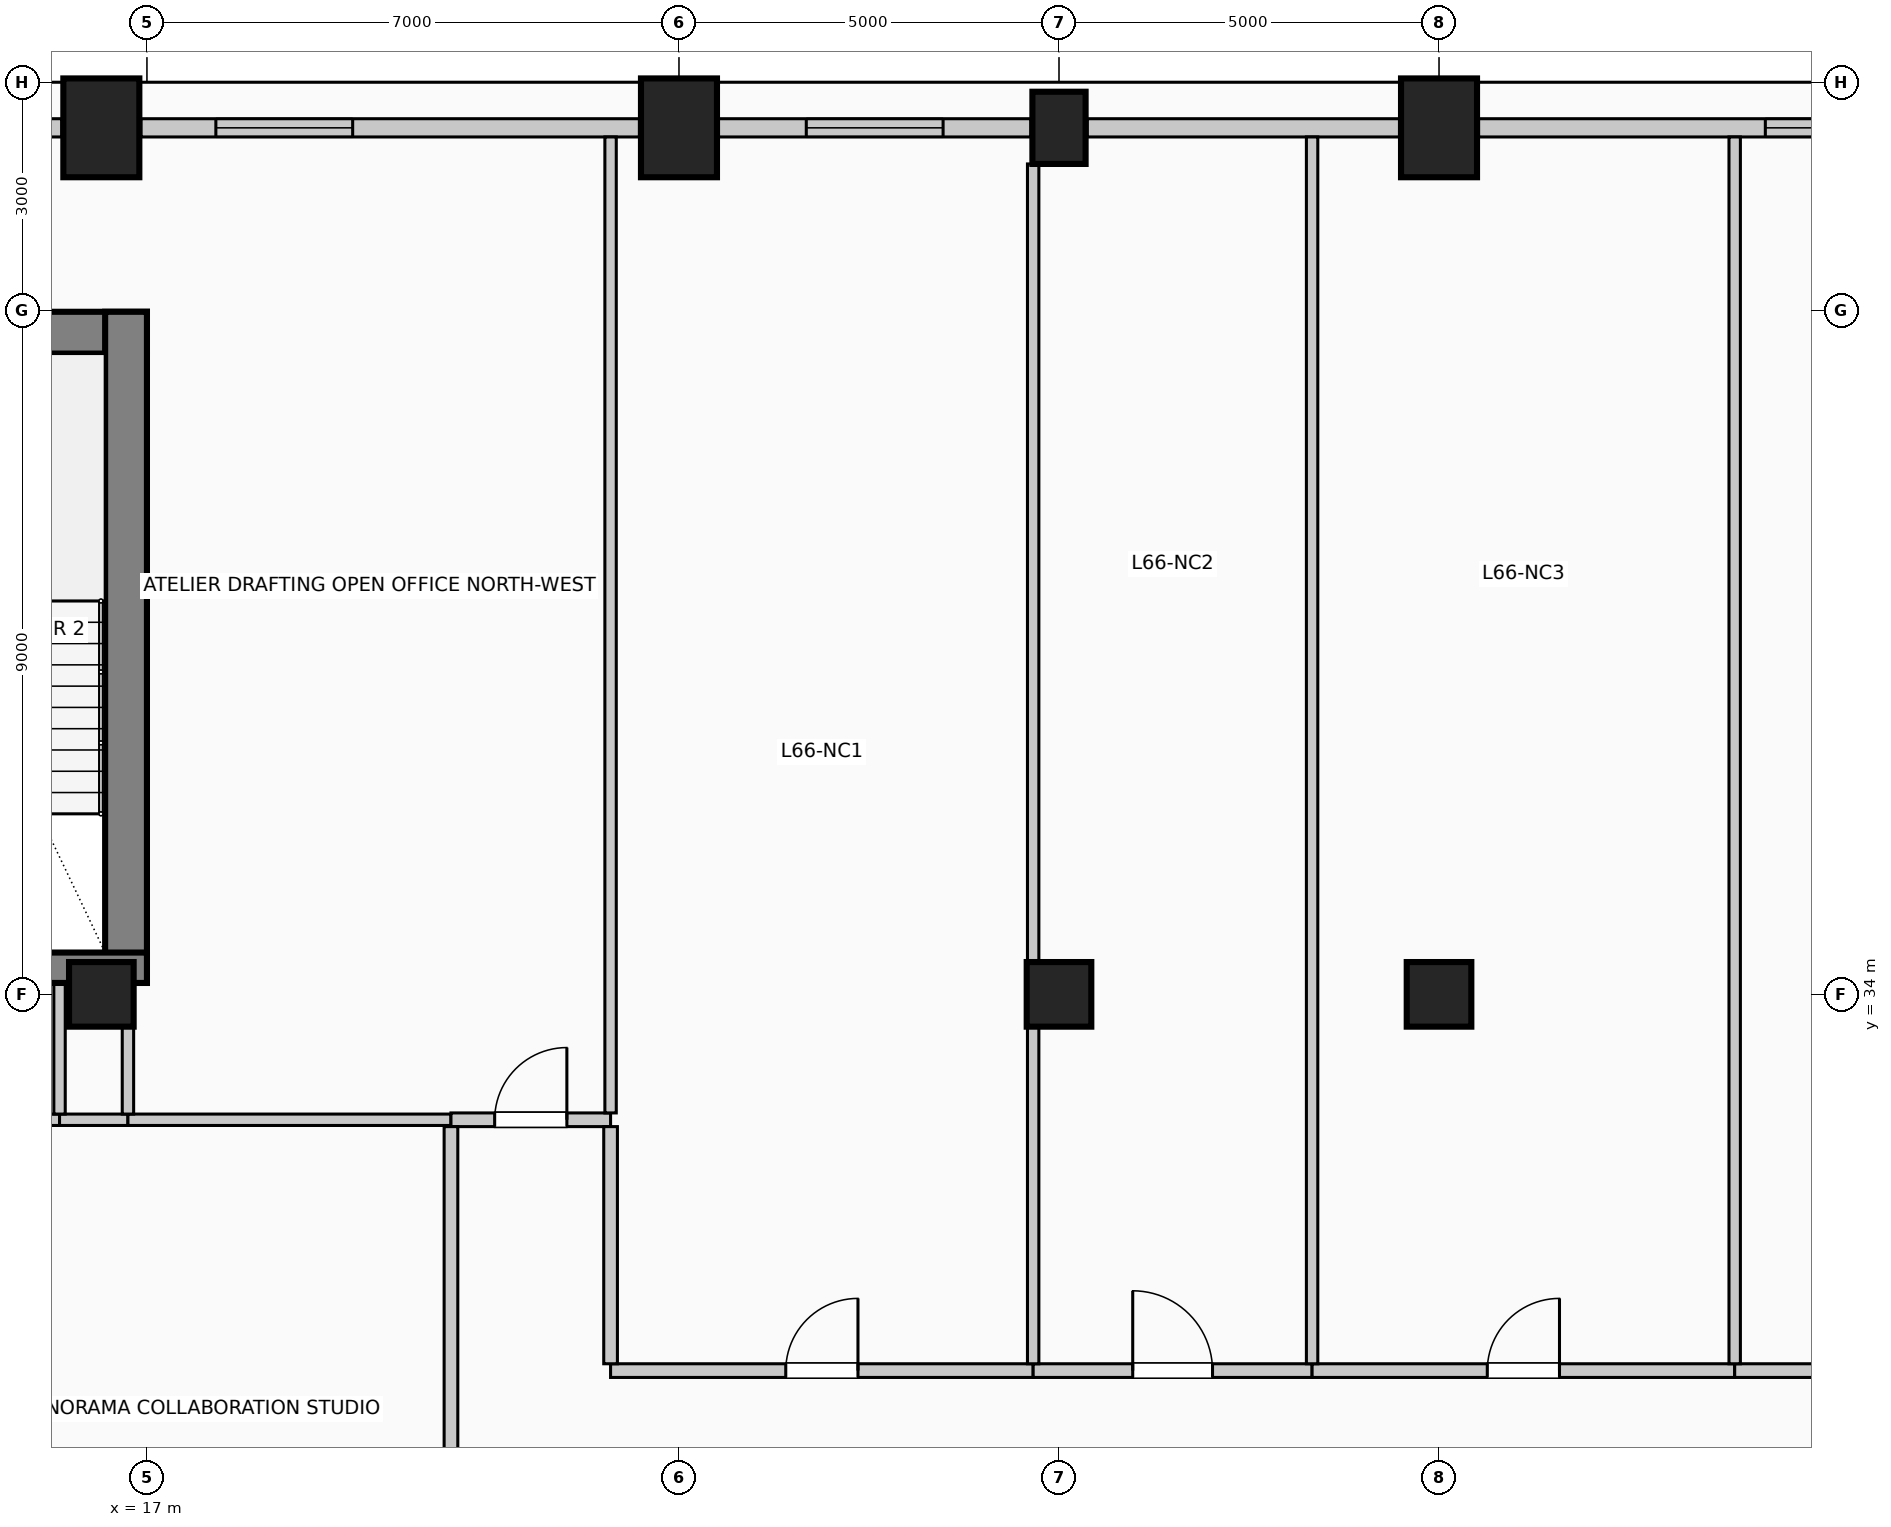
"""IFC4 building model, lengths in metres.
Left out: names, types, materials, properties, quantities, classifications, styles, units other than length and angle.
Written with IfcOpenShell. Run it as: python <this file> out.ifc"""

import sys

from ifc_helpers import new_model, si_unit, direction, frame, frame_2d, origin, origin_2d, place, context, subcontext, project, spatial, rectangle, circle, extrude, element, fill, save


model = new_model("IFC4")
c1 = context("Model", 3, precision=1e-05, world=origin(), true_north=direction((0.0, 1.0)))
c2 = subcontext(c1, "Body", "Model", "MODEL_VIEW")
j1 = project(units=[si_unit("LENGTHUNIT", "METRE"), si_unit("PLANEANGLEUNIT", "RADIAN")], contexts=[c1])
p1 = place(None, origin())
s1 = spatial("IfcSite", under=j1, at=p1, CompositionType="ELEMENT")
p2 = place(p1, origin())
s2 = spatial("IfcBuilding", under=s1, at=p2, CompositionType="ELEMENT")
p3 = place(p2, frame((0.0, 0.0, 272.6)))
s3 = spatial("IfcBuildingStorey", under=s2, at=p3, CompositionType="ELEMENT", Elevation=272.6)
p4 = place(p3, frame((3.0, 42.705, 0.0), z_axis=(0.0, 0.0, 1.0), x_axis=(1.0, 0.0, 0.0)))
e1 = element("IfcWall", 1, at=p4, inside=s3, PredefinedType="SHEAR", context=c2, shape_type="SweptSolid", body=[
    extrude(rectangle(XDim=14.0, YDim=0.55, at=frame_2d((7.0, 0.0))), origin(), (0.0, 0.0, 1.0), 4.0),
])
p5 = place(p3, frame((16.725, 34.15, 0.0), z_axis=(0.0, 0.0, 1.0), x_axis=(0.0, 1.0, 0.0)))
e2 = element("IfcWall", 2, at=p5, inside=s3, PredefinedType="SHEAR", context=c2, shape_type="SweptSolid", body=[
    extrude(rectangle(XDim=8.83, YDim=0.55, at=frame_2d((4.415, 0.0))), origin(), (0.0, 0.0, 1.0), 4.0),
])
p6 = place(p3, frame((12.29, 34.35, 0.0), z_axis=(0.0, 0.0, 1.0), x_axis=(1.0, 0.0, 0.0)))
e3 = element("IfcWall", 3, at=p6, inside=s3, PredefinedType="SHEAR", context=c2, shape_type="SweptSolid", body=[
    extrude(rectangle(XDim=4.71, YDim=0.4, at=frame_2d((2.355, 0.0))), origin(), (0.0, 0.0, 1.0), 4.0),
])
p7 = place(p6, frame((1.4, 0.0, 0.0)))
e4 = element("IfcOpeningElement", 4, at=p7, cuts=e3, PredefinedType="OPENING", context=c2, shape_type="SweptSolid", body=[
    extrude(rectangle(XDim=1.15, YDim=2.2, at=frame_2d((0.575, 1.1))), frame((0.0, 0.21, 0.0), z_axis=(0.0, -1.0, 0.0), x_axis=(1.0, 0.0, 0.0)), (0.0, 0.0, 1.0), 0.42),
])
for number, where, z_axis, x_axis in (
    (5, (16.4, 45.4, 0.0), (0.0, 0.0, 1.0), (1.0, 0.0, 0.0)),
    (6, (24.0, 45.4, 0.0), (0.0, 0.0, 1.0), (1.0, 0.0, 0.0)),
):
    element("IfcColumn", number, at=place(p3, frame(where, z_axis=z_axis, x_axis=x_axis)), inside=s3, PredefinedType="COLUMN", context=c2, shape_type="SweptSolid", body=[
        extrude(rectangle(XDim=1.0, YDim=1.3, at=origin_2d()), origin(), (0.0, 0.0, 1.0), 4.0),
    ])
p8 = place(p3, frame((29.0, 45.4, 0.0), z_axis=(0.0, 0.0, 1.0), x_axis=(1.0, 0.0, 0.0)))
e7 = element("IfcColumn", 7, at=p8, inside=s3, PredefinedType="COLUMN", context=c2, shape_type="SweptSolid", body=[
    extrude(rectangle(XDim=0.7, YDim=0.95, at=origin_2d()), origin(), (0.0, 0.0, 1.0), 4.0),
])
p9 = place(p3, frame((34.0, 45.4, 0.0), z_axis=(0.0, 0.0, 1.0), x_axis=(1.0, 0.0, 0.0)))
e8 = element("IfcColumn", 8, at=p9, inside=s3, PredefinedType="COLUMN", context=c2, shape_type="SweptSolid", body=[
    extrude(rectangle(XDim=1.0, YDim=1.3, at=origin_2d()), origin(), (0.0, 0.0, 1.0), 4.0),
])
for number, where, z_axis, x_axis in (
    (9, (16.4, 34.0, 0.0), (0.0, 0.0, 1.0), (1.0, 0.0, 0.0)),
    (10, (29.0, 34.0, 0.0), (0.0, 0.0, 1.0), (1.0, 0.0, 0.0)),
    (11, (34.0, 34.0, 0.0), (0.0, 0.0, 1.0), (1.0, 0.0, 0.0)),
):
    element("IfcColumn", number, at=place(p3, frame(where, z_axis=z_axis, x_axis=x_axis)), inside=s3, PredefinedType="COLUMN", context=c2, shape_type="SweptSolid", body=[
        extrude(circle(Radius=0.425, at=origin_2d()), origin(), (0.0, 0.0, 1.0), 4.0),
    ])
p10 = place(p3, frame((14.37, 45.4, 0.0), z_axis=(0.0, 0.0, 1.0), x_axis=(1.0, 0.0, 0.0)))
e12 = element("IfcWall", 12, at=p10, inside=s3, PredefinedType="SOLIDWALL", context=c2, shape_type="SweptSolid", body=[
    extrude(rectangle(XDim=1.51, YDim=0.24, at=frame_2d((0.755, 0.0))), origin(), (0.0, 0.0, 1.0), 3.0),
])
p11 = place(p3, frame((16.92, 45.4, 0.0), z_axis=(0.0, 0.0, 1.0), x_axis=(1.0, 0.0, 0.0)))
e13 = element("IfcWall", 13, at=p11, inside=s3, PredefinedType="SOLIDWALL", context=c2, shape_type="SweptSolid", body=[
    extrude(rectangle(XDim=6.56, YDim=0.24, at=frame_2d((3.28, 0.0))), origin(), (0.0, 0.0, 1.0), 3.0),
])
p12 = place(p11, frame((0.987, 0.0, 0.42)))
e14 = element("IfcOpeningElement", 14, at=p12, cuts=e13, PredefinedType="OPENING", context=c2, shape_type="SweptSolid", body=[
    extrude(rectangle(XDim=1.8, YDim=2.2, at=frame_2d((0.9, 1.1))), frame((0.0, 0.13, 0.0), z_axis=(0.0, -1.0, 0.0), x_axis=(1.0, 0.0, 0.0)), (0.0, 0.0, 1.0), 0.26),
])
p13 = place(p3, frame((24.52, 45.4, 0.0), z_axis=(0.0, 0.0, 1.0), x_axis=(1.0, 0.0, 0.0)))
e15 = element("IfcWall", 15, at=p13, inside=s3, PredefinedType="SOLIDWALL", context=c2, shape_type="SweptSolid", body=[
    extrude(rectangle(XDim=4.11, YDim=0.24, at=frame_2d((2.055, 0.0))), origin(), (0.0, 0.0, 1.0), 3.0),
])
p14 = place(p13, frame((1.155, 0.0, 0.42)))
e16 = element("IfcOpeningElement", 16, at=p14, cuts=e15, PredefinedType="OPENING", context=c2, shape_type="SweptSolid", body=[
    extrude(rectangle(XDim=1.8, YDim=2.2, at=frame_2d((0.9, 1.1))), frame((0.0, 0.13, 0.0), z_axis=(0.0, -1.0, 0.0), x_axis=(1.0, 0.0, 0.0)), (0.0, 0.0, 1.0), 0.26),
])
p15 = place(p3, frame((29.37, 45.4, 0.0), z_axis=(0.0, 0.0, 1.0), x_axis=(1.0, 0.0, 0.0)))
e17 = element("IfcWall", 17, at=p15, inside=s3, PredefinedType="SOLIDWALL", context=c2, shape_type="SweptSolid", body=[
    extrude(rectangle(XDim=4.11, YDim=0.24, at=frame_2d((2.055, 0.0))), origin(), (0.0, 0.0, 1.0), 3.0),
])
p16 = place(p3, frame((34.52, 45.4, 0.0), z_axis=(0.0, 0.0, 1.0), x_axis=(1.0, 0.0, 0.0)))
e18 = element("IfcWall", 18, at=p16, inside=s3, PredefinedType="SOLIDWALL", context=c2, shape_type="SweptSolid", body=[
    extrude(rectangle(XDim=6.56, YDim=0.24, at=frame_2d((3.28, 0.0))), origin(), (0.0, 0.0, 1.0), 3.0),
])
p17 = place(p16, frame((3.773, 0.0, 0.42)))
e19 = element("IfcOpeningElement", 19, at=p17, cuts=e18, PredefinedType="OPENING", context=c2, shape_type="SweptSolid", body=[
    extrude(rectangle(XDim=1.8, YDim=2.2, at=frame_2d((0.9, 1.1))), frame((0.0, 0.13, 0.0), z_axis=(0.0, -1.0, 0.0), x_axis=(1.0, 0.0, 0.0)), (0.0, 0.0, 1.0), 0.26),
])
p18 = place(p3, frame((23.1, 29.05, 0.0), z_axis=(0.0, 0.0, 1.0), x_axis=(1.0, 0.0, 0.0)))
e20 = element("IfcWall", 20, at=p18, inside=s3, PredefinedType="PARTITIONING", context=c2, shape_type="SweptSolid", body=[
    extrude(rectangle(XDim=5.56, YDim=0.18, at=frame_2d((2.78, 0.0))), origin(), (0.0, 0.0, 1.0), 3.75),
])
p19 = place(p18, frame((2.305, 0.0, 0.0)))
e21 = element("IfcOpeningElement", 21, at=p19, cuts=e20, PredefinedType="OPENING", context=c2, shape_type="SweptSolid", body=[
    extrude(rectangle(XDim=0.95, YDim=2.15, at=frame_2d((0.475, 1.075))), frame((0.0, 0.1, 0.0), z_axis=(0.0, -1.0, 0.0), x_axis=(1.0, 0.0, 0.0)), (0.0, 0.0, 1.0), 0.2),
])
p20 = place(p3, frame((28.66, 29.05, 0.0), z_axis=(0.0, 0.0, 1.0), x_axis=(1.0, 0.0, 0.0)))
e22 = element("IfcWall", 22, at=p20, inside=s3, PredefinedType="PARTITIONING", context=c2, shape_type="SweptSolid", body=[
    extrude(rectangle(XDim=3.67, YDim=0.18, at=frame_2d((1.835, 0.0))), origin(), (0.0, 0.0, 1.0), 3.75),
])
p21 = place(p20, frame((1.31, 0.0, 0.0)))
e23 = element("IfcOpeningElement", 23, at=p21, cuts=e22, PredefinedType="OPENING", context=c2, shape_type="SweptSolid", body=[
    extrude(rectangle(XDim=1.05, YDim=2.15, at=frame_2d((0.525, 1.075))), frame((0.0, 0.1, 0.0), z_axis=(0.0, -1.0, 0.0), x_axis=(1.0, 0.0, 0.0)), (0.0, 0.0, 1.0), 0.2),
])
p22 = place(p3, frame((32.33, 29.05, 0.0), z_axis=(0.0, 0.0, 1.0), x_axis=(1.0, 0.0, 0.0)))
e24 = element("IfcWall", 24, at=p22, inside=s3, PredefinedType="PARTITIONING", context=c2, shape_type="SweptSolid", body=[
    extrude(rectangle(XDim=5.56, YDim=0.18, at=frame_2d((2.78, 0.0))), origin(), (0.0, 0.0, 1.0), 3.75),
])
p23 = place(p22, frame((2.305, 0.0, 0.0)))
e25 = element("IfcOpeningElement", 25, at=p23, cuts=e24, PredefinedType="OPENING", context=c2, shape_type="SweptSolid", body=[
    extrude(rectangle(XDim=0.95, YDim=2.15, at=frame_2d((0.475, 1.075))), frame((0.0, 0.1, 0.0), z_axis=(0.0, -1.0, 0.0), x_axis=(1.0, 0.0, 0.0)), (0.0, 0.0, 1.0), 0.2),
])
p24 = place(p3, frame((37.89, 29.05, 0.0), z_axis=(0.0, 0.0, 1.0), x_axis=(1.0, 0.0, 0.0)))
e26 = element("IfcWall", 26, at=p24, inside=s3, PredefinedType="PARTITIONING", context=c2, shape_type="SweptSolid", body=[
    extrude(rectangle(XDim=3.66, YDim=0.18, at=frame_2d((1.83, 0.0))), origin(), (0.0, 0.0, 1.0), 3.75),
])
p25 = place(p24, frame((1.305, 0.0, 0.0)))
e27 = element("IfcOpeningElement", 27, at=p25, cuts=e26, PredefinedType="OPENING", context=c2, shape_type="SweptSolid", body=[
    extrude(rectangle(XDim=1.05, YDim=2.15, at=frame_2d((0.525, 1.075))), frame((0.0, 0.1, 0.0), z_axis=(0.0, -1.0, 0.0), x_axis=(1.0, 0.0, 0.0)), (0.0, 0.0, 1.0), 0.2),
])
p26 = place(p3, frame((12.33, 32.35, 0.0), z_axis=(0.0, 0.0, 1.0), x_axis=(1.0, 0.0, 0.0)))
e28 = element("IfcWall", 28, at=p26, inside=s3, PredefinedType="PARTITIONING", context=c2, shape_type="SweptSolid", body=[
    extrude(rectangle(XDim=3.52, YDim=0.15, at=frame_2d((1.76, 0.0))), origin(), (0.0, 0.0, 1.0), 3.75),
])
p27 = place(p26, frame((1.235, 0.0, 0.0)))
e29 = element("IfcOpeningElement", 29, at=p27, cuts=e28, PredefinedType="OPENING", context=c2, shape_type="SweptSolid", body=[
    extrude(rectangle(XDim=1.05, YDim=2.15, at=frame_2d((0.525, 1.075))), frame((0.0, 0.085, 0.0), z_axis=(0.0, -1.0, 0.0), x_axis=(1.0, 0.0, 0.0)), (0.0, 0.0, 1.0), 0.17),
])
p28 = place(p3, frame((15.85, 32.35, 0.0), z_axis=(0.0, 0.0, 1.0), x_axis=(1.0, 0.0, 0.0)))
e30 = element("IfcWall", 30, at=p28, inside=s3, PredefinedType="PARTITIONING", context=c2, shape_type="SweptSolid", body=[
    extrude(rectangle(XDim=0.9, YDim=0.15, at=frame_2d((0.45, 0.0))), origin(), (0.0, 0.0, 1.0), 3.75),
])
p29 = place(p3, frame((16.75, 32.35, 0.0), z_axis=(0.0, 0.0, 1.0), x_axis=(1.0, 0.0, 0.0)))
e31 = element("IfcWall", 31, at=p29, inside=s3, PredefinedType="PARTITIONING", context=c2, shape_type="SweptSolid", body=[
    extrude(rectangle(XDim=4.25, YDim=0.15, at=frame_2d((2.125, 0.0))), origin(), (0.0, 0.0, 1.0), 3.75),
])
p30 = place(p3, frame((21.0, 32.35, 0.0), z_axis=(0.0, 0.0, 1.0), x_axis=(1.0, 0.0, 0.0)))
e32 = element("IfcWall", 32, at=p30, inside=s3, PredefinedType="PARTITIONING", context=c2, shape_type="SweptSolid", body=[
    extrude(rectangle(XDim=2.1, YDim=0.18, at=frame_2d((1.05, 0.0))), origin(), (0.0, 0.0, 1.0), 3.75),
])
p31 = place(p30, frame((0.575, 0.0, 0.0)))
e33 = element("IfcOpeningElement", 33, at=p31, cuts=e32, PredefinedType="OPENING", context=c2, shape_type="SweptSolid", body=[
    extrude(rectangle(XDim=0.95, YDim=2.15, at=frame_2d((0.475, 1.075))), frame((0.0, 0.1, 0.0), z_axis=(0.0, -1.0, 0.0), x_axis=(1.0, 0.0, 0.0)), (0.0, 0.0, 1.0), 0.2),
])
p32 = place(p3, frame((15.85, 32.425, 0.0), z_axis=(0.0, 0.0, 1.0), x_axis=(0.0, 1.0, 0.0)))
e34 = element("IfcWall", 34, at=p32, inside=s3, PredefinedType="PARTITIONING", context=c2, shape_type="SweptSolid", body=[
    extrude(rectangle(XDim=1.725, YDim=0.15, at=frame_2d((0.862, 0.0))), origin(), (0.0, 0.0, 1.0), 3.75),
])
p33 = place(p3, frame((16.75, 32.425, 0.0), z_axis=(0.0, 0.0, 1.0), x_axis=(0.0, 1.0, 0.0)))
e35 = element("IfcWall", 35, at=p33, inside=s3, PredefinedType="PARTITIONING", context=c2, shape_type="SweptSolid", body=[
    extrude(rectangle(XDim=1.15, YDim=0.15, at=frame_2d((0.575, 0.0))), origin(), (0.0, 0.0, 1.0), 3.75),
])
p34 = place(p3, frame((21.0, 24.875, 0.0), z_axis=(0.0, 0.0, 1.0), x_axis=(0.0, 1.0, 0.0)))
e36 = element("IfcWall", 36, at=p34, inside=s3, PredefinedType="PARTITIONING", context=c2, shape_type="SweptSolid", body=[
    extrude(rectangle(XDim=7.385, YDim=0.18, at=frame_2d((3.692, 0.0))), origin(), (0.0, 0.0, 1.0), 3.75),
])
p35 = place(p3, frame((23.1, 29.14, 0.0), z_axis=(0.0, 0.0, 1.0), x_axis=(0.0, 1.0, 0.0)))
e37 = element("IfcWall", 37, at=p35, inside=s3, PredefinedType="PARTITIONING", context=c2, shape_type="SweptSolid", body=[
    extrude(rectangle(XDim=3.12, YDim=0.18, at=frame_2d((1.56, 0.0))), origin(), (0.0, 0.0, 1.0), 3.75),
])
p36 = place(p3, frame((23.1, 32.44, 0.0), z_axis=(0.0, 0.0, 1.0), x_axis=(0.0, 1.0, 0.0)))
e38 = element("IfcWall", 38, at=p36, inside=s3, PredefinedType="PARTITIONING", context=c2, shape_type="SweptSolid", body=[
    extrude(rectangle(XDim=12.84, YDim=0.15, at=frame_2d((6.42, 0.0))), origin(), (0.0, 0.0, 1.0), 3.75),
])
p37 = place(p3, frame((28.66, 29.14, 0.0), z_axis=(0.0, 0.0, 1.0), x_axis=(0.0, 1.0, 0.0)))
e39 = element("IfcWall", 39, at=p37, inside=s3, PredefinedType="PARTITIONING", context=c2, shape_type="SweptSolid", body=[
    extrude(rectangle(XDim=4.435, YDim=0.15, at=frame_2d((2.218, 0.0))), origin(), (0.0, 0.0, 1.0), 3.75),
])
p38 = place(p3, frame((28.66, 34.425, 0.0), z_axis=(0.0, 0.0, 1.0), x_axis=(0.0, 1.0, 0.0)))
e40 = element("IfcWall", 40, at=p38, inside=s3, PredefinedType="PARTITIONING", context=c2, shape_type="SweptSolid", body=[
    extrude(rectangle(XDim=10.5, YDim=0.15, at=frame_2d((5.25, 0.0))), origin(), (0.0, 0.0, 1.0), 3.75),
])
for number, where, z_axis, x_axis in (
    (41, (32.33, 29.14, 0.0), (0.0, 0.0, 1.0), (0.0, 1.0, 0.0)),
    (42, (37.89, 29.14, 0.0), (0.0, 0.0, 1.0), (0.0, 1.0, 0.0)),
):
    element("IfcWall", number, at=place(p3, frame(where, z_axis=z_axis, x_axis=x_axis)), inside=s3, PredefinedType="PARTITIONING", context=c2, shape_type="SweptSolid", body=[
        extrude(rectangle(XDim=16.14, YDim=0.15, at=frame_2d((8.07, 0.0))), origin(), (0.0, 0.0, 1.0), 3.75),
    ])
p39 = place(p12, origin())
e43 = element("IfcWindow", 43, at=p39, inside=s3, PartitioningType="SINGLE_PANEL", PredefinedType="WINDOW", context=c2, shape_type="SweptSolid", body=[
    extrude(rectangle(XDim=1.8, YDim=2.2, at=frame_2d((0.9, 1.1))), frame((0.0, 0.03, 0.0), z_axis=(0.0, -1.0, 0.0), x_axis=(1.0, 0.0, 0.0)), (0.0, 0.0, 1.0), 0.06),
])
fill(e14, e43)
p40 = place(p14, origin())
e44 = element("IfcWindow", 44, at=p40, inside=s3, PartitioningType="SINGLE_PANEL", PredefinedType="WINDOW", context=c2, shape_type="SweptSolid", body=[
    extrude(rectangle(XDim=1.8, YDim=2.2, at=frame_2d((0.9, 1.1))), frame((0.0, 0.03, 0.0), z_axis=(0.0, -1.0, 0.0), x_axis=(1.0, 0.0, 0.0)), (0.0, 0.0, 1.0), 0.06),
])
fill(e16, e44)
p41 = place(p17, origin())
e45 = element("IfcWindow", 45, at=p41, inside=s3, PartitioningType="SINGLE_PANEL", PredefinedType="WINDOW", context=c2, shape_type="SweptSolid", body=[
    extrude(rectangle(XDim=1.8, YDim=2.2, at=frame_2d((0.9, 1.1))), frame((0.0, 0.03, 0.0), z_axis=(0.0, -1.0, 0.0), x_axis=(1.0, 0.0, 0.0)), (0.0, 0.0, 1.0), 0.06),
])
fill(e19, e45)
p42 = place(p19, origin())
e46 = element("IfcDoor", 46, at=p42, inside=s3, OperationType="SINGLE_SWING_RIGHT", PredefinedType="DOOR", context=c2, shape_type="SweptSolid", body=[
    extrude(rectangle(XDim=0.95, YDim=2.15, at=frame_2d((0.475, 1.075))), frame((0.0, 0.025, 0.0), z_axis=(0.0, -1.0, 0.0), x_axis=(1.0, 0.0, 0.0)), (0.0, 0.0, 1.0), 0.05),
])
fill(e21, e46)
p43 = place(p21, origin())
e47 = element("IfcDoor", 47, at=p43, inside=s3, OperationType="SINGLE_SWING_LEFT", PredefinedType="DOOR", context=c2, shape_type="SweptSolid", body=[
    extrude(rectangle(XDim=1.05, YDim=2.15, at=frame_2d((0.525, 1.075))), frame((0.0, 0.025, 0.0), z_axis=(0.0, -1.0, 0.0), x_axis=(1.0, 0.0, 0.0)), (0.0, 0.0, 1.0), 0.05),
])
fill(e23, e47)
p44 = place(p23, origin())
e48 = element("IfcDoor", 48, at=p44, inside=s3, OperationType="SINGLE_SWING_RIGHT", PredefinedType="DOOR", context=c2, shape_type="SweptSolid", body=[
    extrude(rectangle(XDim=0.95, YDim=2.15, at=frame_2d((0.475, 1.075))), frame((0.0, 0.025, 0.0), z_axis=(0.0, -1.0, 0.0), x_axis=(1.0, 0.0, 0.0)), (0.0, 0.0, 1.0), 0.05),
])
fill(e25, e48)
p45 = place(p31, origin())
e49 = element("IfcDoor", 49, at=p45, inside=s3, OperationType="SINGLE_SWING_RIGHT", PredefinedType="DOOR", context=c2, shape_type="SweptSolid", body=[
    extrude(rectangle(XDim=0.95, YDim=2.15, at=frame_2d((0.475, 1.075))), frame((0.0, 0.025, 0.0), z_axis=(0.0, -1.0, 0.0), x_axis=(1.0, 0.0, 0.0)), (0.0, 0.0, 1.0), 0.05),
])
fill(e33, e49)
save(model, sys.argv[1])
